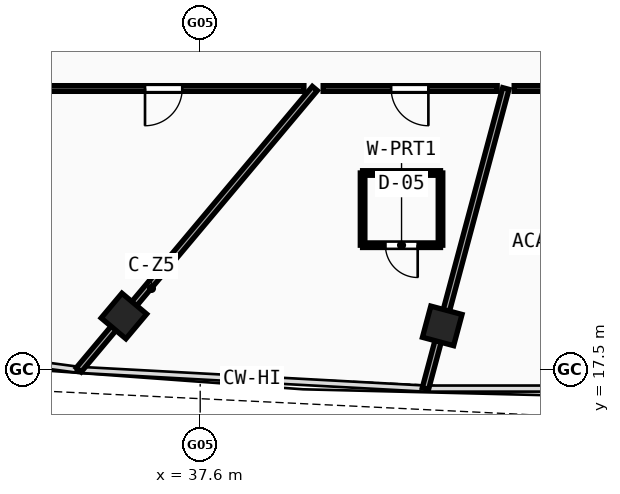
"""IFC4 building model, lengths in metres.
Left out: names, types, materials, properties, quantities, classifications, styles, units other than length and angle.
Written with IfcOpenShell. Run it as: python <this file> out.ifc"""

import sys

from ifc_helpers import new_model, si_unit, direction, frame, frame_2d, origin, origin_with_axes, origin_2d, place, context, subcontext, project, spatial, rectangle, hollow_rectangle, extrude, source, transform, mapped, element, fill, save


model = new_model("IFC4")
c1 = context("Model", 3, precision=1e-05, world=origin(), true_north=direction((0.0, 1.0)))
c2 = subcontext(c1, "Body", "Model", "MODEL_VIEW")
j1 = project(units=[si_unit("LENGTHUNIT", "METRE"), si_unit("PLANEANGLEUNIT", "RADIAN")], contexts=[c1])
p1 = place(None, origin())
s1 = spatial("IfcSite", under=j1, at=p1, CompositionType="ELEMENT")
p2 = place(p1, origin())
s2 = spatial("IfcBuilding", under=s1, at=p2, CompositionType="ELEMENT")
p3 = place(p2, frame((0.0, 0.0, 255.72)))
s3 = spatial("IfcBuildingStorey", under=s2, at=p3, CompositionType="ELEMENT", Elevation=255.72)
m1 = source(origin(), c2, "Body", "SweptSolid", [
    extrude(hollow_rectangle(XDim=0.85, YDim=0.85, WallThickness=0.034, at=origin_2d()), origin(), (0.0, 0.0, 1.0), 3.73),
])
for number, where, z_axis, x_axis in (
    (1, (35.593, 18.914, -0.26), (0.0, 0.0, 1.0), (0.766, -0.643, 0.0)),
    (2, (43.969, 18.654, -0.26), (0.0, 0.0, 1.0), (0.966, -0.259, 0.0)),
):
    element("IfcColumn", number, at=place(p3, frame(where, z_axis=z_axis, x_axis=x_axis)), inside=s3, PredefinedType="COLUMN", context=c2, shape_type="MappedRepresentation", body=[
        mapped(m1, transform((0.0, 0.0, 0.0), scale=1.0)),
    ])
p4 = place(p3, frame((40.616, 24.9, 0.0), z_axis=(0.0, 0.0, 1.0), x_axis=(-0.642795010628, -0.766038232931, 0.0)))
e3 = element("IfcWall", 3, at=p4, inside=s3, PredefinedType="PARTITIONING", context=c2, shape_type="SweptSolid", body=[
    extrude(rectangle(XDim=9.663, YDim=0.17, at=frame_2d((4.832, 0.0))), origin(), (0.0, 0.0, 1.0), 2.82),
])
p5 = place(p3, frame((45.642, 24.9, 0.0), z_axis=(0.0, 0.0, 1.0), x_axis=(-0.258833622746, -0.965921920103, 0.0)))
e4 = element("IfcWall", 4, at=p5, inside=s3, PredefinedType="PARTITIONING", context=c2, shape_type="SweptSolid", body=[
    extrude(rectangle(XDim=8.174, YDim=0.17, at=frame_2d((4.087, 0.0))), origin(), (0.0, 0.0, 1.0), 2.82),
])
p6 = place(p3, frame((53.279, 24.9, 0.0), z_axis=(0.0, 0.0, 1.0), x_axis=(-1.0, 0.0, 0.0)))
e5 = element("IfcWall", 5, at=p6, inside=s3, PredefinedType="PARTITIONING", context=c2, shape_type="SweptSolid", body=[
    extrude(rectangle(XDim=7.417, YDim=0.15, at=frame_2d((3.708, 0.0))), origin(), (0.0, 0.0, 1.0), 2.82),
])
p7 = place(p6, frame((3.234, 0.0, 0.0)))
e6 = element("IfcOpeningElement", 6, at=p7, cuts=e5, PredefinedType="OPENING", context=c2, shape_type="SweptSolid", body=[
    extrude(rectangle(XDim=0.98, YDim=2.12, at=frame_2d((0.49, 1.06))), frame((0.0, 0.085, 0.0), z_axis=(0.0, -1.0, 0.0), x_axis=(1.0, 0.0, 0.0)), (0.0, 0.0, 1.0), 0.17),
])
p8 = place(p3, frame((45.414, 24.9, 0.0), z_axis=(0.0, 0.0, 1.0), x_axis=(-1.0, 0.0, 0.0)))
e7 = element("IfcWall", 7, at=p8, inside=s3, PredefinedType="PARTITIONING", context=c2, shape_type="SweptSolid", body=[
    extrude(rectangle(XDim=4.579, YDim=0.15, at=frame_2d((2.289, 0.0))), origin(), (0.0, 0.0, 1.0), 2.82),
])
p9 = place(p8, frame((1.81, 0.0, 0.0)))
e8 = element("IfcOpeningElement", 8, at=p9, cuts=e7, PredefinedType="OPENING", context=c2, shape_type="SweptSolid", body=[
    extrude(rectangle(XDim=0.98, YDim=2.12, at=frame_2d((0.49, 1.06))), frame((0.0, 0.085, 0.0), z_axis=(0.0, -1.0, 0.0), x_axis=(1.0, 0.0, 0.0)), (0.0, 0.0, 1.0), 0.17),
])
p10 = place(p3, frame((40.329, 24.9, 0.0), z_axis=(0.0, 0.0, 1.0), x_axis=(-1.0, 0.0, 0.0)))
e9 = element("IfcWall", 9, at=p10, inside=s3, PredefinedType="PARTITIONING", context=c2, shape_type="SweptSolid", body=[
    extrude(rectangle(XDim=7.179, YDim=0.15, at=frame_2d((3.589, 0.0))), origin(), (0.0, 0.0, 1.0), 3.12),
])
p11 = place(p10, frame((3.201, 0.0, 0.0)))
e10 = element("IfcOpeningElement", 10, at=p11, cuts=e9, PredefinedType="OPENING", context=c2, shape_type="SweptSolid", body=[
    extrude(rectangle(XDim=0.98, YDim=2.12, at=frame_2d((0.49, 1.06))), frame((0.0, 0.085, 0.0), z_axis=(0.0, -1.0, 0.0), x_axis=(1.0, 0.0, 0.0)), (0.0, 0.0, 1.0), 0.17),
])
p12 = place(p3, frame((41.873, 20.777, 0.0), z_axis=(0.0, 0.0, 1.0), x_axis=(1.0, 0.0, 0.0)))
e11 = element("IfcWall", 11, at=p12, inside=s3, PredefinedType="PARTITIONING", context=c2, shape_type="SweptSolid", body=[
    extrude(rectangle(XDim=2.05, YDim=0.12, at=frame_2d((1.025, 0.0))), origin(), (0.0, 0.0, 1.0), 3.47),
])
p13 = place(p12, frame((0.6, 0.0, 0.0)))
e12 = element("IfcOpeningElement", 12, at=p13, cuts=e11, PredefinedType="OPENING", context=c2, shape_type="SweptSolid", body=[
    extrude(rectangle(XDim=0.85, YDim=2.1, at=frame_2d((0.425, 1.05))), frame((0.0, 0.07, 0.0), z_axis=(0.0, -1.0, 0.0), x_axis=(1.0, 0.0, 0.0)), (0.0, 0.0, 1.0), 0.14),
])
p14 = place(p3, frame((43.923, 20.777, 0.0), z_axis=(0.0, 0.0, 1.0), x_axis=(0.0, 1.0, 0.0)))
e13 = element("IfcWall", 13, at=p14, inside=s3, PredefinedType="PARTITIONING", context=c2, shape_type="SweptSolid", body=[
    extrude(rectangle(XDim=1.9, YDim=0.12, at=frame_2d((0.95, 0.0))), origin(), (0.0, 0.0, 1.0), 3.12),
])
p15 = place(p3, frame((43.923, 22.677, 0.0), z_axis=(0.0, 0.0, 1.0), x_axis=(-1.0, 0.0, 0.0)))
e14 = element("IfcWall", 14, at=p15, inside=s3, PredefinedType="PARTITIONING", context=c2, shape_type="SweptSolid", body=[
    extrude(rectangle(XDim=2.05, YDim=0.12, at=frame_2d((1.025, 0.0))), origin(), (0.0, 0.0, 1.0), 3.47),
])
p16 = place(p3, frame((41.873, 22.677, 0.0), z_axis=(0.0, 0.0, 1.0), x_axis=(0.0, -1.0, 0.0)))
e15 = element("IfcWall", 15, at=p16, inside=s3, PredefinedType="PARTITIONING", context=c2, shape_type="SweptSolid", body=[
    extrude(rectangle(XDim=1.9, YDim=0.12, at=frame_2d((0.95, 0.0))), origin(), (0.0, 0.0, 1.0), 3.12),
])
m2 = source(origin(), c2, "Body", "SweptSolid", [
    extrude(rectangle(XDim=0.98, YDim=2.12, at=frame_2d((0.49, 1.06))), frame((0.0, 0.025, 0.0), z_axis=(0.0, -1.0, 0.0), x_axis=(1.0, 0.0, 0.0)), (0.0, 0.0, 1.0), 0.05),
])
p17 = place(p11, origin_with_axes())
e16 = element("IfcDoor", 16, at=p17, inside=s3, OperationType="SINGLE_SWING_RIGHT", PredefinedType="DOOR", context=c2, shape_type="MappedRepresentation", body=[
    mapped(m2, transform((0.0, 0.0, 0.0), scale=1.0)),
])
fill(e10, e16)
p18 = place(p9, origin_with_axes())
e17 = element("IfcDoor", 17, at=p18, inside=s3, OperationType="SINGLE_SWING_LEFT", PredefinedType="DOOR", context=c2, shape_type="MappedRepresentation", body=[
    mapped(m2, transform((0.0, 0.0, 0.0), scale=1.0)),
])
fill(e8, e17)
m3 = source(origin(), c2, "Body", "SweptSolid", [
    extrude(rectangle(XDim=0.85, YDim=2.1, at=frame_2d((0.425, 1.05))), frame((0.0, 0.025, 0.0), z_axis=(0.0, -1.0, 0.0), x_axis=(1.0, 0.0, 0.0)), (0.0, 0.0, 1.0), 0.05),
])
p19 = place(p13, frame((0.85, 0.0, 0.0), z_axis=(0.0, 0.0, 1.0), x_axis=(-1.0, 0.0, 0.0)))
e18 = element("IfcDoor", 18, at=p19, inside=s3, OperationType="SINGLE_SWING_LEFT", PredefinedType="DOOR", context=c2, shape_type="MappedRepresentation", body=[
    mapped(m3, transform((0.0, 0.0, 0.0), scale=1.0)),
])
fill(e12, e18)
save(model, sys.argv[1])
